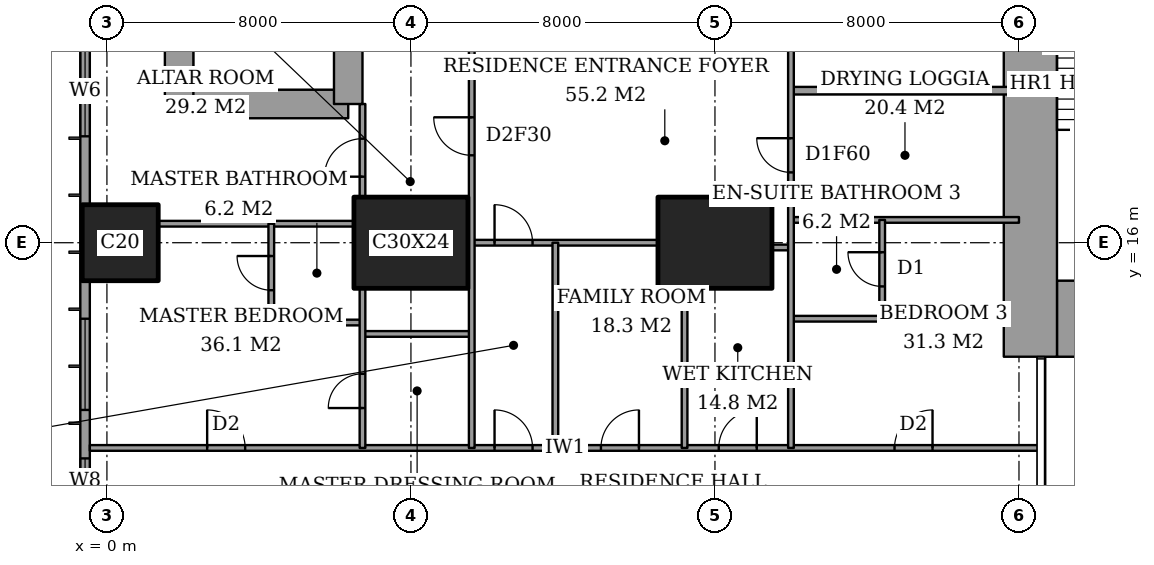
"""IFC4 building model, lengths in metres.
Left out: names, types, materials, properties, quantities, classifications, styles, units other than length and angle.
Written with IfcOpenShell. Run it as: python <this file> out.ifc"""

import sys

from ifc_helpers import new_model, si_unit, direction, frame, frame_2d, origin, origin_2d, place, context, subcontext, project, spatial, rectangle, extrude, element, fill, save


model = new_model("IFC4")
c1 = context("Model", 3, precision=1e-05, world=origin(), true_north=direction((0.0, 1.0)))
c2 = subcontext(c1, "Body", "Model", "MODEL_VIEW")
j1 = project(units=[si_unit("LENGTHUNIT", "METRE"), si_unit("PLANEANGLEUNIT", "RADIAN")], contexts=[c1])
p1 = place(None, origin())
s1 = spatial("IfcSite", under=j1, at=p1, CompositionType="ELEMENT")
p2 = place(p1, origin())
s2 = spatial("IfcBuilding", under=s1, at=p2, CompositionType="ELEMENT")
p3 = place(p2, frame((0.0, 0.0, 80.0)))
s3 = spatial("IfcBuildingStorey", under=s2, at=p3, CompositionType="ELEMENT", Elevation=80.0)
p4 = place(p3, frame((0.35, 16.0, 0.0), z_axis=(0.0, 0.0, 1.0), x_axis=(1.0, 0.0, 0.0)))
e1 = element("IfcColumn", 1, at=p4, inside=s3, PredefinedType="COLUMN", context=c2, shape_type="SweptSolid", body=[
    extrude(rectangle(XDim=2.0, YDim=2.0, at=origin_2d()), origin(), (0.0, 0.0, 1.0), 3.6),
])
for number, where, z_axis, x_axis in (
    (2, (8.0, 16.0, 0.0), (0.0, 0.0, 1.0), (1.0, 0.0, 0.0)),
    (3, (16.0, 16.0, 0.0), (0.0, 0.0, 1.0), (1.0, 0.0, 0.0)),
):
    element("IfcColumn", number, at=place(p3, frame(where, z_axis=z_axis, x_axis=x_axis)), inside=s3, PredefinedType="COLUMN", context=c2, shape_type="SweptSolid", body=[
        extrude(rectangle(XDim=3.0, YDim=2.4, at=origin_2d()), origin(), (0.0, 0.0, 1.0), 3.6),
    ])
p5 = place(p3, frame((25.0, 14.0, 0.0), z_axis=(0.0, 0.0, 1.0), x_axis=(1.0, 0.0, 0.0)))
e4 = element("IfcWall", 4, at=p5, inside=s3, PredefinedType="SHEAR", context=c2, shape_type="SweptSolid", body=[
    extrude(rectangle(XDim=3.15, YDim=2.0, at=frame_2d((1.575, 0.0))), origin(), (0.0, 0.0, 1.0), 3.6),
])
p6 = place(p3, frame((24.3, 13.0, 0.0), z_axis=(0.0, 0.0, 1.0), x_axis=(0.0, 1.0, 0.0)))
e5 = element("IfcWall", 5, at=p6, inside=s3, PredefinedType="SHEAR", context=c2, shape_type="SweptSolid", body=[
    extrude(rectangle(XDim=10.15, YDim=1.4, at=frame_2d((5.075, 0.0))), origin(), (0.0, 0.0, 1.0), 3.6),
])
p7 = place(p3, frame((1.9, 19.65, 0.0), z_axis=(0.0, 0.0, 1.0), x_axis=(1.0, 0.0, 0.0)))
e6 = element("IfcWall", 6, at=p7, inside=s3, PredefinedType="SHEAR", context=c2, shape_type="SweptSolid", body=[
    extrude(rectangle(XDim=4.45, YDim=0.75, at=frame_2d((2.225, 0.0))), origin(), (0.0, 0.0, 1.0), 3.6),
])
p8 = place(p3, frame((6.35, 19.65, 0.0), z_axis=(0.0, 0.0, 1.0), x_axis=(0.0, 1.0, 0.0)))
e7 = element("IfcWall", 7, at=p8, inside=s3, PredefinedType="SHEAR", context=c2, shape_type="SweptSolid", body=[
    extrude(rectangle(XDim=8.7, YDim=0.75, at=frame_2d((4.35, 0.0))), origin(), (0.0, 0.0, 1.0), 3.6),
])
p9 = place(p8, frame((6.725, 0.0, 0.0)))
e8 = element("IfcOpeningElement", 8, at=p9, cuts=e7, PredefinedType="OPENING", context=c2, shape_type="SweptSolid", body=[
    extrude(rectangle(XDim=1.0, YDim=2.1, at=frame_2d((0.5, 1.05))), frame((0.0, 0.385, 0.0), z_axis=(0.0, -1.0, 0.0), x_axis=(1.0, 0.0, 0.0)), (0.0, 0.0, 1.0), 0.77),
])
p10 = place(p3, frame((1.9, 28.35, 0.0), z_axis=(0.0, 0.0, 1.0), x_axis=(0.0, -1.0, 0.0)))
e9 = element("IfcWall", 9, at=p10, inside=s3, PredefinedType="SHEAR", context=c2, shape_type="SweptSolid", body=[
    extrude(rectangle(XDim=8.7, YDim=0.75, at=frame_2d((4.35, 0.0))), origin(), (0.0, 0.0, 1.0), 3.6),
])
p11 = place(p3, frame((-0.575, 44.825, 0.0), z_axis=(0.0, 0.0, 1.0), x_axis=(0.0, -1.0, 0.0)))
e10 = element("IfcWall", 10, at=p11, inside=s3, PredefinedType="SOLIDWALL", context=c2, shape_type="SweptSolid", body=[
    extrude(rectangle(XDim=41.65, YDim=0.25, at=frame_2d((20.825, 0.0))), origin(), (0.0, 0.0, 1.0), 3.6),
])
p12 = place(p11, frame((0.775, 0.0, 0.6)))
e11 = element("IfcOpeningElement", 11, at=p12, cuts=e10, PredefinedType="OPENING", context=c2, shape_type="SweptSolid", body=[
    extrude(rectangle(XDim=2.4, YDim=2.0, at=frame_2d((1.2, 1.0))), frame((0.0, 0.135, 0.0), z_axis=(0.0, -1.0, 0.0), x_axis=(1.0, 0.0, 0.0)), (0.0, 0.0, 1.0), 0.27),
])
p13 = place(p11, frame((6.1, 0.0, 0.6)))
e12 = element("IfcOpeningElement", 12, at=p13, cuts=e10, PredefinedType="OPENING", context=c2, shape_type="SweptSolid", body=[
    extrude(rectangle(XDim=1.2, YDim=2.0, at=frame_2d((0.6, 1.0))), frame((0.0, 0.135, 0.0), z_axis=(0.0, -1.0, 0.0), x_axis=(1.0, 0.0, 0.0)), (0.0, 0.0, 1.0), 0.27),
])
p14 = place(p11, frame((8.425, 0.0, 0.6)))
e13 = element("IfcOpeningElement", 13, at=p14, cuts=e10, PredefinedType="OPENING", context=c2, shape_type="SweptSolid", body=[
    extrude(rectangle(XDim=2.4, YDim=2.0, at=frame_2d((1.2, 1.0))), frame((0.0, 0.135, 0.0), z_axis=(0.0, -1.0, 0.0), x_axis=(1.0, 0.0, 0.0)), (0.0, 0.0, 1.0), 0.27),
])
p15 = place(p11, frame((15.625, 0.0, 0.6)))
e14 = element("IfcOpeningElement", 14, at=p15, cuts=e10, PredefinedType="OPENING", context=c2, shape_type="SweptSolid", body=[
    extrude(rectangle(XDim=2.4, YDim=2.0, at=frame_2d((1.2, 1.0))), frame((0.0, 0.135, 0.0), z_axis=(0.0, -1.0, 0.0), x_axis=(1.0, 0.0, 0.0)), (0.0, 0.0, 1.0), 0.27),
])
p16 = place(p11, frame((23.625, 0.0, 0.6)))
e15 = element("IfcOpeningElement", 15, at=p16, cuts=e10, PredefinedType="OPENING", context=c2, shape_type="SweptSolid", body=[
    extrude(rectangle(XDim=2.4, YDim=2.0, at=frame_2d((1.2, 1.0))), frame((0.0, 0.135, 0.0), z_axis=(0.0, -1.0, 0.0), x_axis=(1.0, 0.0, 0.0)), (0.0, 0.0, 1.0), 0.27),
])
p17 = place(p11, frame((30.825, 0.0, 0.6)))
e16 = element("IfcOpeningElement", 16, at=p17, cuts=e10, PredefinedType="OPENING", context=c2, shape_type="SweptSolid", body=[
    extrude(rectangle(XDim=2.4, YDim=2.0, at=frame_2d((1.2, 1.0))), frame((0.0, 0.135, 0.0), z_axis=(0.0, -1.0, 0.0), x_axis=(1.0, 0.0, 0.0)), (0.0, 0.0, 1.0), 0.27),
])
p18 = place(p11, frame((34.5, 0.0, 0.6)))
e17 = element("IfcOpeningElement", 17, at=p18, cuts=e10, PredefinedType="OPENING", context=c2, shape_type="SweptSolid", body=[
    extrude(rectangle(XDim=1.2, YDim=2.0, at=frame_2d((0.6, 1.0))), frame((0.0, 0.135, 0.0), z_axis=(0.0, -1.0, 0.0), x_axis=(1.0, 0.0, 0.0)), (0.0, 0.0, 1.0), 0.27),
])
p19 = place(p11, frame((38.475, 0.0, 0.6)))
e18 = element("IfcOpeningElement", 18, at=p19, cuts=e10, PredefinedType="OPENING", context=c2, shape_type="SweptSolid", body=[
    extrude(rectangle(XDim=2.4, YDim=2.0, at=frame_2d((1.2, 1.0))), frame((0.0, 0.135, 0.0), z_axis=(0.0, -1.0, 0.0), x_axis=(1.0, 0.0, 0.0)), (0.0, 0.0, 1.0), 0.27),
])
p20 = place(p3, frame((-0.45, 10.6, 0.0), z_axis=(0.0, 0.0, 1.0), x_axis=(1.0, 0.0, 0.0)))
e19 = element("IfcWall", 19, at=p20, inside=s3, PredefinedType="PARTITIONING", context=c2, shape_type="SweptSolid", body=[
    extrude(rectangle(XDim=25.011, YDim=0.15, at=frame_2d((12.505, 0.0))), origin(), (0.0, 0.0, 1.0), 3.35),
])
p21 = place(p20, frame((10.65, 0.0, 0.0)))
e20 = element("IfcOpeningElement", 20, at=p21, cuts=e19, PredefinedType="OPENING", context=c2, shape_type="SweptSolid", body=[
    extrude(rectangle(XDim=1.0, YDim=2.1, at=frame_2d((0.5, 1.05))), frame((0.0, 0.085, 0.0), z_axis=(0.0, -1.0, 0.0), x_axis=(1.0, 0.0, 0.0)), (0.0, 0.0, 1.0), 0.17),
])
p22 = place(p20, frame((3.087, 0.0, 0.0)))
e21 = element("IfcOpeningElement", 21, at=p22, cuts=e19, PredefinedType="OPENING", context=c2, shape_type="SweptSolid", body=[
    extrude(rectangle(XDim=1.0, YDim=2.1, at=frame_2d((0.5, 1.05))), frame((0.0, 0.085, 0.0), z_axis=(0.0, -1.0, 0.0), x_axis=(1.0, 0.0, 0.0)), (0.0, 0.0, 1.0), 0.17),
])
p23 = place(p20, frame((13.45, 0.0, 0.0)))
e22 = element("IfcOpeningElement", 22, at=p23, cuts=e19, PredefinedType="OPENING", context=c2, shape_type="SweptSolid", body=[
    extrude(rectangle(XDim=1.0, YDim=2.1, at=frame_2d((0.5, 1.05))), frame((0.0, 0.085, 0.0), z_axis=(0.0, -1.0, 0.0), x_axis=(1.0, 0.0, 0.0)), (0.0, 0.0, 1.0), 0.17),
])
p24 = place(p20, frame((16.55, 0.0, 0.0)))
e23 = element("IfcOpeningElement", 23, at=p24, cuts=e19, PredefinedType="OPENING", context=c2, shape_type="SweptSolid", body=[
    extrude(rectangle(XDim=1.0, YDim=2.1, at=frame_2d((0.5, 1.05))), frame((0.0, 0.085, 0.0), z_axis=(0.0, -1.0, 0.0), x_axis=(1.0, 0.0, 0.0)), (0.0, 0.0, 1.0), 0.17),
])
p25 = place(p20, frame((21.175, 0.0, 0.0)))
e24 = element("IfcOpeningElement", 24, at=p25, cuts=e19, PredefinedType="OPENING", context=c2, shape_type="SweptSolid", body=[
    extrude(rectangle(XDim=1.0, YDim=2.1, at=frame_2d((0.5, 1.05))), frame((0.0, 0.085, 0.0), z_axis=(0.0, -1.0, 0.0), x_axis=(1.0, 0.0, 0.0)), (0.0, 0.0, 1.0), 0.17),
])
p26 = place(p3, frame((6.725, 13.6, 0.0), z_axis=(0.0, 0.0, 1.0), x_axis=(1.0, 0.0, 0.0)))
e25 = element("IfcWall", 25, at=p26, inside=s3, PredefinedType="PARTITIONING", context=c2, shape_type="SweptSolid", body=[
    extrude(rectangle(XDim=2.875, YDim=0.15, at=frame_2d((1.438, 0.0))), origin(), (0.0, 0.0, 1.0), 3.35),
])
p27 = place(p3, frame((4.325, 13.9, 0.0), z_axis=(0.0, 0.0, 1.0), x_axis=(1.0, 0.0, 0.0)))
e26 = element("IfcWall", 26, at=p27, inside=s3, PredefinedType="PARTITIONING", context=c2, shape_type="SweptSolid", body=[
    extrude(rectangle(XDim=2.4, YDim=0.15, at=frame_2d((1.2, 0.0))), origin(), (0.0, 0.0, 1.0), 3.35),
])
p28 = place(p3, frame((18.0, 14.0, 0.0), z_axis=(0.0, 0.0, 1.0), x_axis=(1.0, 0.0, 0.0)))
e27 = element("IfcWall", 27, at=p28, inside=s3, PredefinedType="PARTITIONING", context=c2, shape_type="SweptSolid", body=[
    extrude(rectangle(XDim=2.4, YDim=0.15, at=frame_2d((1.2, 0.0))), origin(), (0.0, 0.0, 1.0), 3.35),
])
p29 = place(p3, frame((17.5, 15.875, 0.0), z_axis=(0.0, 0.0, 1.0), x_axis=(1.0, 0.0, 0.0)))
e28 = element("IfcWall", 28, at=p29, inside=s3, PredefinedType="PARTITIONING", context=c2, shape_type="SweptSolid", body=[
    extrude(rectangle(XDim=0.5, YDim=0.15, at=frame_2d((0.25, 0.0))), origin(), (0.0, 0.0, 1.0), 2.634),
])
p30 = place(p3, frame((9.6, 16.0, 0.0), z_axis=(0.0, 0.0, 1.0), x_axis=(1.0, 0.0, 0.0)))
e29 = element("IfcWall", 29, at=p30, inside=s3, PredefinedType="PARTITIONING", context=c2, shape_type="SweptSolid", body=[
    extrude(rectangle(XDim=4.9, YDim=0.15, at=frame_2d((2.45, 0.0))), origin(), (0.0, 0.0, 1.0), 2.634),
])
p31 = place(p30, frame((0.6, 0.0, 0.0)))
e30 = element("IfcOpeningElement", 30, at=p31, cuts=e29, PredefinedType="OPENING", context=c2, shape_type="SweptSolid", body=[
    extrude(rectangle(XDim=1.0, YDim=2.1, at=frame_2d((0.5, 1.05))), frame((0.0, 0.085, 0.0), z_axis=(0.0, -1.0, 0.0), x_axis=(1.0, 0.0, 0.0)), (0.0, 0.0, 1.0), 0.17),
])
p32 = place(p3, frame((1.35, 16.5, 0.0), z_axis=(0.0, 0.0, 1.0), x_axis=(1.0, 0.0, 0.0)))
e31 = element("IfcWall", 31, at=p32, inside=s3, PredefinedType="PARTITIONING", context=c2, shape_type="SweptSolid", body=[
    extrude(rectangle(XDim=5.15, YDim=0.15, at=frame_2d((2.575, 0.0))), origin(), (0.0, 0.0, 1.0), 3.35),
])
p33 = place(p3, frame((18.0, 16.6, 0.0), z_axis=(0.0, 0.0, 1.0), x_axis=(1.0, 0.0, 0.0)))
e32 = element("IfcWall", 32, at=p33, inside=s3, PredefinedType="PARTITIONING", context=c2, shape_type="SweptSolid", body=[
    extrude(rectangle(XDim=6.0, YDim=0.15, at=frame_2d((3.0, 0.0))), origin(), (0.0, 0.0, 1.0), 3.35),
])
p34 = place(p3, frame((18.0, 20.0, 0.0), z_axis=(0.0, 0.0, 1.0), x_axis=(1.0, 0.0, 0.0)))
e33 = element("IfcWall", 33, at=p34, inside=s3, PredefinedType="PARTITIONING", context=c2, shape_type="SweptSolid", body=[
    extrude(rectangle(XDim=6.0, YDim=0.2, at=frame_2d((3.0, 0.0))), origin(), (0.0, 0.0, 1.0), 3.35),
])
p35 = place(p3, frame((4.325, 13.9, 0.0), z_axis=(0.0, 0.0, 1.0), x_axis=(0.0, 1.0, 0.0)))
e34 = element("IfcWall", 34, at=p35, inside=s3, PredefinedType="PARTITIONING", context=c2, shape_type="SweptSolid", body=[
    extrude(rectangle(XDim=2.6, YDim=0.15, at=frame_2d((1.3, 0.0))), origin(), (0.0, 0.0, 1.0), 3.35),
])
p36 = place(p35, frame((0.85, 0.0, 0.0)))
e35 = element("IfcOpeningElement", 35, at=p36, cuts=e34, PredefinedType="OPENING", context=c2, shape_type="SweptSolid", body=[
    extrude(rectangle(XDim=0.9, YDim=2.1, at=frame_2d((0.45, 1.05))), frame((0.0, 0.085, 0.0), z_axis=(0.0, -1.0, 0.0), x_axis=(1.0, 0.0, 0.0)), (0.0, 0.0, 1.0), 0.17),
])
p37 = place(p3, frame((6.725, 10.6, 0.0), z_axis=(0.0, 0.0, 1.0), x_axis=(0.0, 1.0, 0.0)))
e36 = element("IfcWall", 36, at=p37, inside=s3, PredefinedType="PARTITIONING", context=c2, shape_type="SweptSolid", body=[
    extrude(rectangle(XDim=4.2, YDim=0.15, at=frame_2d((2.1, 0.0))), origin(), (0.0, 0.0, 1.0), 3.35),
])
p38 = place(p37, frame((1.05, 0.0, 0.0)))
e37 = element("IfcOpeningElement", 37, at=p38, cuts=e36, PredefinedType="OPENING", context=c2, shape_type="SweptSolid", body=[
    extrude(rectangle(XDim=0.9, YDim=2.1, at=frame_2d((0.45, 1.05))), frame((0.0, 0.085, 0.0), z_axis=(0.0, -1.0, 0.0), x_axis=(1.0, 0.0, 0.0)), (0.0, 0.0, 1.0), 0.17),
])
p39 = place(p3, frame((6.725, 17.2, 0.0), z_axis=(0.0, 0.0, 1.0), x_axis=(0.0, 1.0, 0.0)))
e38 = element("IfcWall", 38, at=p39, inside=s3, PredefinedType="PARTITIONING", context=c2, shape_type="SweptSolid", body=[
    extrude(rectangle(XDim=2.45, YDim=0.15, at=frame_2d((1.225, 0.0))), origin(), (0.0, 0.0, 1.0), 3.35),
])
p40 = place(p39, frame((0.538, 0.0, 0.0)))
e39 = element("IfcOpeningElement", 39, at=p40, cuts=e38, PredefinedType="OPENING", context=c2, shape_type="SweptSolid", body=[
    extrude(rectangle(XDim=1.0, YDim=2.1, at=frame_2d((0.5, 1.05))), frame((0.0, 0.085, 0.0), z_axis=(0.0, -1.0, 0.0), x_axis=(1.0, 0.0, 0.0)), (0.0, 0.0, 1.0), 0.17),
])
p41 = place(p3, frame((9.6, 10.6, 0.0), z_axis=(0.0, 0.0, 1.0), x_axis=(0.0, 1.0, 0.0)))
e40 = element("IfcWall", 40, at=p41, inside=s3, PredefinedType="PARTITIONING", context=c2, shape_type="SweptSolid", body=[
    extrude(rectangle(XDim=11.0, YDim=0.15, at=frame_2d((5.5, 0.0))), origin(), (0.0, 0.0, 1.0), 3.35),
])
p42 = place(p41, frame((7.7, 0.0, 0.0)))
e41 = element("IfcOpeningElement", 41, at=p42, cuts=e40, PredefinedType="OPENING", context=c2, shape_type="SweptSolid", body=[
    extrude(rectangle(XDim=1.0, YDim=2.1, at=frame_2d((0.5, 1.05))), frame((0.0, 0.085, 0.0), z_axis=(0.0, -1.0, 0.0), x_axis=(1.0, 0.0, 0.0)), (0.0, 0.0, 1.0), 0.17),
])
p43 = place(p3, frame((11.8, 10.6, 0.0), z_axis=(0.0, 0.0, 1.0), x_axis=(0.0, 1.0, 0.0)))
e42 = element("IfcWall", 42, at=p43, inside=s3, PredefinedType="PARTITIONING", context=c2, shape_type="SweptSolid", body=[
    extrude(rectangle(XDim=5.4, YDim=0.15, at=frame_2d((2.7, 0.0))), origin(), (0.0, 0.0, 1.0), 3.35),
])
p44 = place(p3, frame((15.2, 10.6, 0.0), z_axis=(0.0, 0.0, 1.0), x_axis=(0.0, 1.0, 0.0)))
e43 = element("IfcWall", 43, at=p44, inside=s3, PredefinedType="PARTITIONING", context=c2, shape_type="SweptSolid", body=[
    extrude(rectangle(XDim=4.2, YDim=0.15, at=frame_2d((2.1, 0.0))), origin(), (0.0, 0.0, 1.0), 3.35),
])
p45 = place(p3, frame((18.0, 10.6, 0.0), z_axis=(0.0, 0.0, 1.0), x_axis=(0.0, 1.0, 0.0)))
e44 = element("IfcWall", 44, at=p45, inside=s3, PredefinedType="PARTITIONING", context=c2, shape_type="SweptSolid", body=[
    extrude(rectangle(XDim=13.4, YDim=0.15, at=frame_2d((6.7, 0.0))), origin(), (0.0, 0.0, 1.0), 3.35),
])
p46 = place(p45, frame((10.8, 0.0, 0.0)))
e45 = element("IfcOpeningElement", 45, at=p46, cuts=e44, PredefinedType="OPENING", context=c2, shape_type="SweptSolid", body=[
    extrude(rectangle(XDim=1.2, YDim=2.4, at=frame_2d((0.6, 1.2))), frame((0.0, 0.085, 0.0), z_axis=(0.0, -1.0, 0.0), x_axis=(1.0, 0.0, 0.0)), (0.0, 0.0, 1.0), 0.17),
])
p47 = place(p45, frame((7.25, 0.0, 0.0)))
e46 = element("IfcOpeningElement", 46, at=p47, cuts=e44, PredefinedType="OPENING", context=c2, shape_type="SweptSolid", body=[
    extrude(rectangle(XDim=0.9, YDim=2.1, at=frame_2d((0.45, 1.05))), frame((0.0, 0.085, 0.0), z_axis=(0.0, -1.0, 0.0), x_axis=(1.0, 0.0, 0.0)), (0.0, 0.0, 1.0), 0.17),
])
p48 = place(p3, frame((20.4, 14.0, 0.0), z_axis=(0.0, 0.0, 1.0), x_axis=(0.0, 1.0, 0.0)))
e47 = element("IfcWall", 47, at=p48, inside=s3, PredefinedType="PARTITIONING", context=c2, shape_type="SweptSolid", body=[
    extrude(rectangle(XDim=2.6, YDim=0.15, at=frame_2d((1.3, 0.0))), origin(), (0.0, 0.0, 1.0), 3.35),
])
p49 = place(p48, frame((0.85, 0.0, 0.0)))
e48 = element("IfcOpeningElement", 48, at=p49, cuts=e47, PredefinedType="OPENING", context=c2, shape_type="SweptSolid", body=[
    extrude(rectangle(XDim=0.9, YDim=2.1, at=frame_2d((0.45, 1.05))), frame((0.0, 0.085, 0.0), z_axis=(0.0, -1.0, 0.0), x_axis=(1.0, 0.0, 0.0)), (0.0, 0.0, 1.0), 0.17),
])
p50 = place(p16, origin())
e49 = element("IfcWindow", 49, at=p50, inside=s3, PartitioningType="SINGLE_PANEL", PredefinedType="WINDOW", context=c2, shape_type="SweptSolid", body=[
    extrude(rectangle(XDim=2.4, YDim=2.0, at=frame_2d((1.2, 1.0))), frame((0.0, 0.03, 0.0), z_axis=(0.0, -1.0, 0.0), x_axis=(1.0, 0.0, 0.0)), (0.0, 0.0, 1.0), 0.06),
])
fill(e15, e49)
p51 = place(p17, origin())
e50 = element("IfcWindow", 50, at=p51, inside=s3, PartitioningType="SINGLE_PANEL", PredefinedType="WINDOW", context=c2, shape_type="SweptSolid", body=[
    extrude(rectangle(XDim=2.4, YDim=2.0, at=frame_2d((1.2, 1.0))), frame((0.0, 0.03, 0.0), z_axis=(0.0, -1.0, 0.0), x_axis=(1.0, 0.0, 0.0)), (0.0, 0.0, 1.0), 0.06),
])
fill(e16, e50)
p52 = place(p18, origin())
e51 = element("IfcWindow", 51, at=p52, inside=s3, PartitioningType="SINGLE_PANEL", PredefinedType="WINDOW", context=c2, shape_type="SweptSolid", body=[
    extrude(rectangle(XDim=1.2, YDim=2.0, at=frame_2d((0.6, 1.0))), frame((0.0, 0.03, 0.0), z_axis=(0.0, -1.0, 0.0), x_axis=(1.0, 0.0, 0.0)), (0.0, 0.0, 1.0), 0.06),
])
fill(e17, e51)
p53 = place(p21, origin())
e52 = element("IfcDoor", 52, at=p53, inside=s3, OperationType="SINGLE_SWING_RIGHT", PredefinedType="DOOR", context=c2, shape_type="SweptSolid", body=[
    extrude(rectangle(XDim=1.0, YDim=2.1, at=frame_2d((0.5, 1.05))), frame((0.0, 0.025, 0.0), z_axis=(0.0, -1.0, 0.0), x_axis=(1.0, 0.0, 0.0)), (0.0, 0.0, 1.0), 0.05),
])
fill(e20, e52)
p54 = place(p36, origin())
e53 = element("IfcDoor", 53, at=p54, inside=s3, OperationType="SINGLE_SWING_LEFT", PredefinedType="DOOR", context=c2, shape_type="SweptSolid", body=[
    extrude(rectangle(XDim=0.9, YDim=2.1, at=frame_2d((0.45, 1.05))), frame((0.0, 0.025, 0.0), z_axis=(0.0, -1.0, 0.0), x_axis=(1.0, 0.0, 0.0)), (0.0, 0.0, 1.0), 0.05),
])
fill(e35, e53)
p55 = place(p22, origin())
e54 = element("IfcDoor", 54, at=p55, inside=s3, OperationType="SINGLE_SWING_RIGHT", PredefinedType="DOOR", context=c2, shape_type="SweptSolid", body=[
    extrude(rectangle(XDim=1.0, YDim=2.1, at=frame_2d((0.5, 1.05))), frame((0.0, 0.025, 0.0), z_axis=(0.0, -1.0, 0.0), x_axis=(1.0, 0.0, 0.0)), (0.0, 0.0, 1.0), 0.05),
])
fill(e21, e54)
p56 = place(p40, origin())
e55 = element("IfcDoor", 55, at=p56, inside=s3, OperationType="SINGLE_SWING_RIGHT", PredefinedType="DOOR", context=c2, shape_type="SweptSolid", body=[
    extrude(rectangle(XDim=1.0, YDim=2.1, at=frame_2d((0.5, 1.05))), frame((0.0, 0.025, 0.0), z_axis=(0.0, -1.0, 0.0), x_axis=(1.0, 0.0, 0.0)), (0.0, 0.0, 1.0), 0.05),
])
fill(e39, e55)
p57 = place(p38, origin())
e56 = element("IfcDoor", 56, at=p57, inside=s3, OperationType="SINGLE_SWING_RIGHT", PredefinedType="DOOR", context=c2, shape_type="SweptSolid", body=[
    extrude(rectangle(XDim=0.9, YDim=2.1, at=frame_2d((0.45, 1.05))), frame((0.0, 0.025, 0.0), z_axis=(0.0, -1.0, 0.0), x_axis=(1.0, 0.0, 0.0)), (0.0, 0.0, 1.0), 0.05),
])
fill(e37, e56)
p58 = place(p42, origin())
e57 = element("IfcDoor", 57, at=p58, inside=s3, OperationType="SINGLE_SWING_LEFT", PredefinedType="DOOR", context=c2, shape_type="SweptSolid", body=[
    extrude(rectangle(XDim=1.0, YDim=2.1, at=frame_2d((0.5, 1.05))), frame((0.0, 0.025, 0.0), z_axis=(0.0, -1.0, 0.0), x_axis=(1.0, 0.0, 0.0)), (0.0, 0.0, 1.0), 0.05),
])
fill(e41, e57)
p59 = place(p31, origin())
e58 = element("IfcDoor", 58, at=p59, inside=s3, OperationType="SINGLE_SWING_RIGHT", PredefinedType="DOOR", context=c2, shape_type="SweptSolid", body=[
    extrude(rectangle(XDim=1.0, YDim=2.1, at=frame_2d((0.5, 1.05))), frame((0.0, 0.025, 0.0), z_axis=(0.0, -1.0, 0.0), x_axis=(1.0, 0.0, 0.0)), (0.0, 0.0, 1.0), 0.05),
])
fill(e30, e58)
p60 = place(p23, origin())
e59 = element("IfcDoor", 59, at=p60, inside=s3, OperationType="SINGLE_SWING_LEFT", PredefinedType="DOOR", context=c2, shape_type="SweptSolid", body=[
    extrude(rectangle(XDim=1.0, YDim=2.1, at=frame_2d((0.5, 1.05))), frame((0.0, 0.025, 0.0), z_axis=(0.0, -1.0, 0.0), x_axis=(1.0, 0.0, 0.0)), (0.0, 0.0, 1.0), 0.05),
])
fill(e22, e59)
p61 = place(p24, origin())
e60 = element("IfcDoor", 60, at=p61, inside=s3, OperationType="SINGLE_SWING_LEFT", PredefinedType="DOOR", context=c2, shape_type="SweptSolid", body=[
    extrude(rectangle(XDim=1.0, YDim=2.1, at=frame_2d((0.5, 1.05))), frame((0.0, 0.025, 0.0), z_axis=(0.0, -1.0, 0.0), x_axis=(1.0, 0.0, 0.0)), (0.0, 0.0, 1.0), 0.05),
])
fill(e23, e60)
p62 = place(p49, origin())
e61 = element("IfcDoor", 61, at=p62, inside=s3, OperationType="SINGLE_SWING_LEFT", PredefinedType="DOOR", context=c2, shape_type="SweptSolid", body=[
    extrude(rectangle(XDim=0.9, YDim=2.1, at=frame_2d((0.45, 1.05))), frame((0.0, 0.025, 0.0), z_axis=(0.0, -1.0, 0.0), x_axis=(1.0, 0.0, 0.0)), (0.0, 0.0, 1.0), 0.05),
])
fill(e48, e61)
p63 = place(p25, origin())
e62 = element("IfcDoor", 62, at=p63, inside=s3, OperationType="SINGLE_SWING_LEFT", PredefinedType="DOOR", context=c2, shape_type="SweptSolid", body=[
    extrude(rectangle(XDim=1.0, YDim=2.1, at=frame_2d((0.5, 1.05))), frame((0.0, 0.025, 0.0), z_axis=(0.0, -1.0, 0.0), x_axis=(1.0, 0.0, 0.0)), (0.0, 0.0, 1.0), 0.05),
])
fill(e24, e62)
p64 = place(p47, origin())
e63 = element("IfcDoor", 63, at=p64, inside=s3, OperationType="SINGLE_SWING_LEFT", PredefinedType="DOOR", context=c2, shape_type="SweptSolid", body=[
    extrude(rectangle(XDim=0.9, YDim=2.1, at=frame_2d((0.45, 1.05))), frame((0.0, 0.025, 0.0), z_axis=(0.0, -1.0, 0.0), x_axis=(1.0, 0.0, 0.0)), (0.0, 0.0, 1.0), 0.05),
])
fill(e46, e63)
save(model, sys.argv[1])
